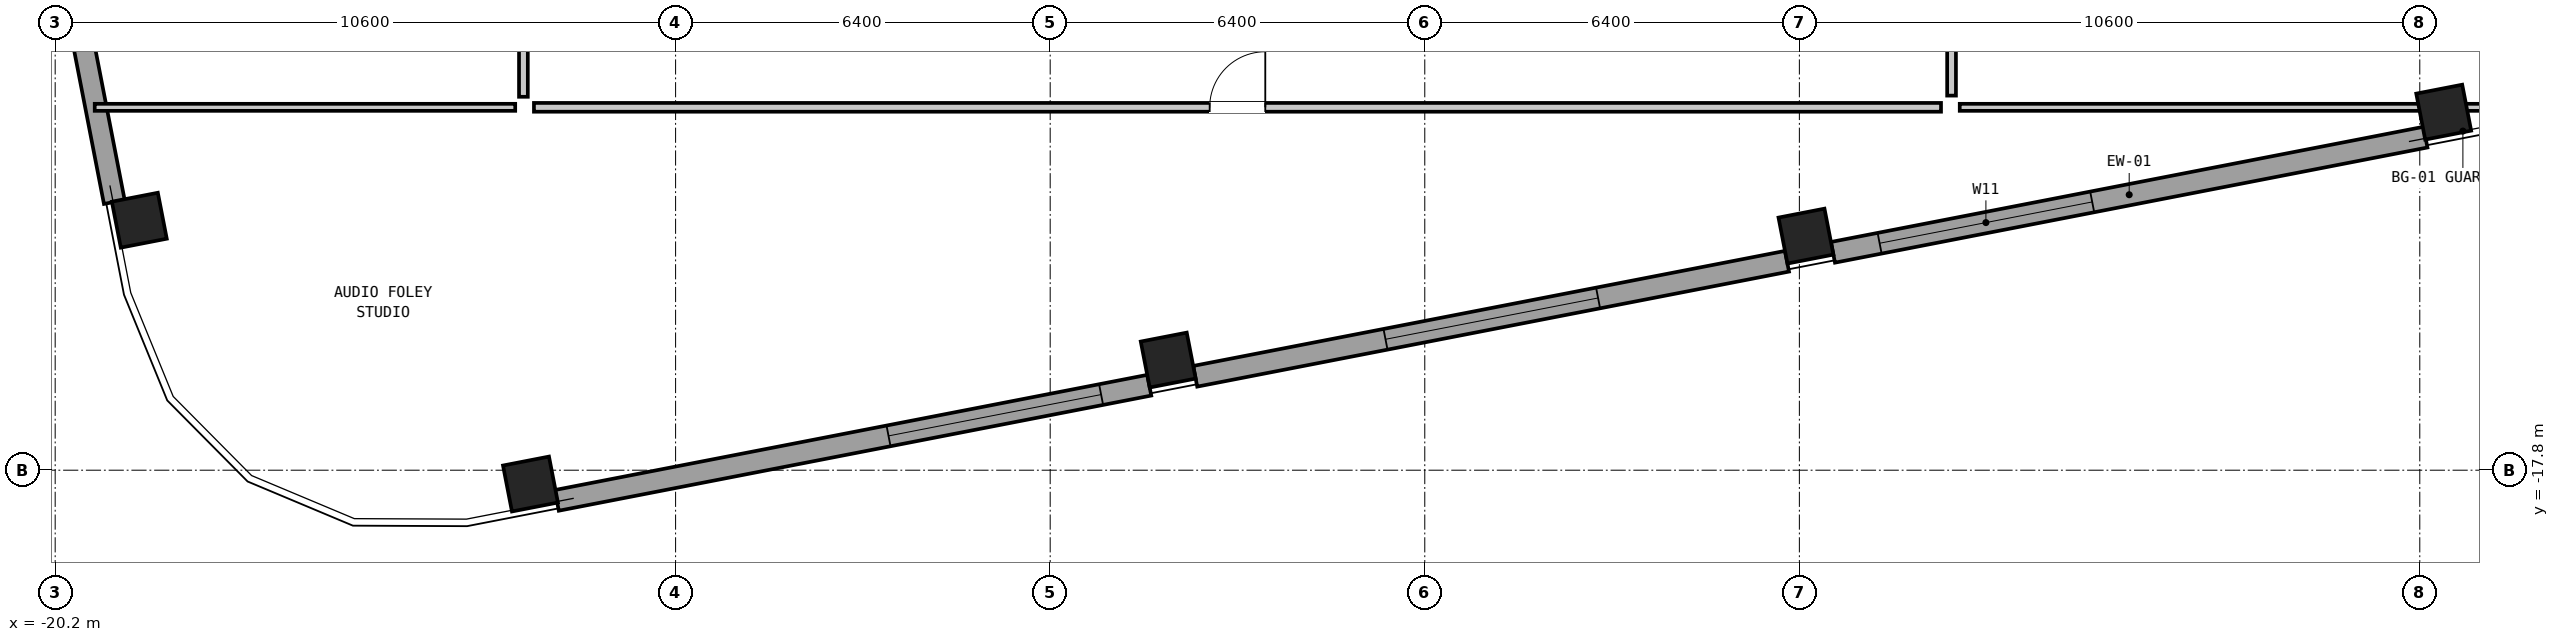
"""IFC4 building model, lengths in metres.
Left out: names, types, materials, properties, quantities, classifications, styles, units other than length and angle.
Written with IfcOpenShell. Run it as: python <this file> out.ifc"""

import sys

from ifc_helpers import new_model, si_unit, direction, frame, frame_2d, origin, origin_2d, place, context, subcontext, project, spatial, rectangle, hollow_rectangle, extrude, element, fill, save


model = new_model("IFC4")
c1 = context("Model", 3, precision=1e-05, world=origin(), true_north=direction((0.0, 1.0)))
c2 = subcontext(c1, "Body", "Model", "MODEL_VIEW")
j1 = project(units=[si_unit("LENGTHUNIT", "METRE"), si_unit("PLANEANGLEUNIT", "RADIAN")], contexts=[c1])
p1 = place(None, origin())
s1 = spatial("IfcSite", under=j1, at=p1, CompositionType="ELEMENT")
p2 = place(p1, origin())
s2 = spatial("IfcBuilding", under=s1, at=p2, CompositionType="ELEMENT")
p3 = place(p2, frame((0.0, 0.0, 112.8)))
s3 = spatial("IfcBuildingStorey", under=s2, at=p3, CompositionType="ELEMENT", Elevation=112.8)
for number, where, z_axis, x_axis in (
    (1, (-12.08, -18.036, 0.0), (0.0, 0.0, 1.0), (0.982, 0.191, 0.0)),
    (2, (-1.183, -15.918, 0.0), (0.0, 0.0, 1.0), (0.982, 0.191, 0.0)),
    (3, (9.713, -13.8, 0.0), (0.0, 0.0, 1.0), (0.982, 0.191, 0.0)),
    (4, (20.609, -11.682, 0.0), (0.0, 0.0, 1.0), (0.982, 0.191, 0.0)),
    (5, (-18.762, -13.529, 0.0), (0.0, 0.0, 1.0), (-0.191, 0.982, 0.0)),
):
    element("IfcColumn", number, at=place(p3, frame(where, z_axis=z_axis, x_axis=x_axis)), inside=s3, PredefinedType="COLUMN", context=c2, shape_type="SweptSolid", body=[
        extrude(hollow_rectangle(XDim=0.8, YDim=0.8, WallThickness=0.05, at=origin_2d()), origin(), (0.0, 0.0, 1.0), 3.05),
    ])
p4 = place(p3, frame((20.296, -12.11, 0.0), z_axis=(0.0, 0.0, 1.0), x_axis=(-0.981628941133, -0.190799952646, 0.0)))
e6 = element("IfcWall", 6, at=p4, inside=s3, PredefinedType="SOLIDWALL", context=c2, shape_type="SweptSolid", body=[
    extrude(rectangle(XDim=10.312, YDim=0.36, at=frame_2d((5.156, 0.0))), origin(), (0.0, 0.0, 1.0), 1.632),
])
p5 = place(p4, frame((5.8, 0.0, 0.2)))
e7 = element("IfcOpeningElement", 7, at=p5, cuts=e6, PredefinedType="OPENING", context=c2, shape_type="SweptSolid", body=[
    extrude(rectangle(XDim=3.7, YDim=1.1, at=frame_2d((1.85, 0.55))), frame((0.0, 0.192, 0.0), z_axis=(0.0, -1.0, 0.0), x_axis=(1.0, 0.0, 0.0)), (0.0, 0.0, 1.0), 0.384),
])
p6 = place(p3, frame((9.389, -14.23, 0.0), z_axis=(0.0, 0.0, 1.0), x_axis=(-0.981627477005, -0.190807485147, 0.0)))
e8 = element("IfcWall", 8, at=p6, inside=s3, PredefinedType="SOLIDWALL", context=c2, shape_type="SweptSolid", body=[
    extrude(rectangle(XDim=10.3, YDim=0.36, at=frame_2d((5.15, 0.0))), origin(), (0.0, 0.0, 1.0), 1.632),
])
p7 = place(p6, frame((3.288, 0.0, 0.2)))
e9 = element("IfcOpeningElement", 9, at=p7, cuts=e8, PredefinedType="OPENING", context=c2, shape_type="SweptSolid", body=[
    extrude(rectangle(XDim=3.7, YDim=1.1, at=frame_2d((1.85, 0.55))), frame((0.0, 0.192, 0.0), z_axis=(0.0, -1.0, 0.0), x_axis=(1.0, 0.0, 0.0)), (0.0, 0.0, 1.0), 0.384),
])
p8 = place(p3, frame((-1.507, -16.348, 0.0), z_axis=(0.0, 0.0, 1.0), x_axis=(-0.981628941133, -0.190799952646, 0.0)))
e10 = element("IfcWall", 10, at=p8, inside=s3, PredefinedType="SOLIDWALL", context=c2, shape_type="SweptSolid", body=[
    extrude(rectangle(XDim=10.312, YDim=0.36, at=frame_2d((5.156, 0.0))), origin(), (0.0, 0.0, 1.0), 1.632),
])
p9 = place(p8, frame((0.838, 0.0, 0.2)))
e11 = element("IfcOpeningElement", 11, at=p9, cuts=e10, PredefinedType="OPENING", context=c2, shape_type="SweptSolid", body=[
    extrude(rectangle(XDim=3.7, YDim=1.1, at=frame_2d((1.85, 0.55))), frame((0.0, 0.192, 0.0), z_axis=(0.0, -1.0, 0.0), x_axis=(1.0, 0.0, 0.0)), (0.0, 0.0, 1.0), 0.384),
])
p10 = place(p3, frame((-19.19, -13.217, 0.0), z_axis=(0.0, 0.0, 1.0), x_axis=(-0.190822765986, 0.981624506612, 0.0)))
e12 = element("IfcWall", 12, at=p10, inside=s3, PredefinedType="SOLIDWALL", context=c2, shape_type="SweptSolid", body=[
    extrude(rectangle(XDim=10.312, YDim=0.36, at=frame_2d((5.156, 0.0))), origin(), (0.0, 0.0, 1.0), 1.632),
])
p11 = place(p10, frame((5.6, 0.0, 0.2)))
e13 = element("IfcOpeningElement", 13, at=p11, cuts=e12, PredefinedType="OPENING", context=c2, shape_type="SweptSolid", body=[
    extrude(rectangle(XDim=4.1, YDim=1.05, at=frame_2d((2.05, 0.525))), frame((0.0, 0.192, 0.0), z_axis=(0.0, -1.0, 0.0), x_axis=(1.0, 0.0, 0.0)), (0.0, 0.0, 1.0), 0.384),
])
p12 = place(p3, frame((-19.524, -11.6, 0.0), z_axis=(0.0, 0.0, 1.0), x_axis=(1.0, 0.0, 0.0)))
e14 = element("IfcWall", 14, at=p12, inside=s3, PredefinedType="PARTITIONING", context=c2, shape_type="SweptSolid", body=[
    extrude(rectangle(XDim=7.184, YDim=0.12, at=frame_2d((3.592, 0.0))), origin(), (0.0, 0.0, 1.0), 2.347),
])
p13 = place(p3, frame((12.34, -11.6, 0.0), z_axis=(0.0, 0.0, 1.0), x_axis=(1.0, 0.0, 0.0)))
e15 = element("IfcWall", 15, at=p13, inside=s3, PredefinedType="PARTITIONING", context=c2, shape_type="SweptSolid", body=[
    extrude(rectangle(XDim=10.066, YDim=0.12, at=frame_2d((5.033, 0.0))), origin(), (0.0, 0.0, 1.0), 1.692),
])
p14 = place(p3, frame((-12.02, -11.6, 0.0), z_axis=(0.0, 0.0, 1.0), x_axis=(1.0, 0.0, 0.0)))
e16 = element("IfcWall", 16, at=p14, inside=s3, PredefinedType="PARTITIONING", context=c2, shape_type="SweptSolid", body=[
    extrude(rectangle(XDim=24.04, YDim=0.15, at=frame_2d((12.02, 0.0))), origin(), (0.0, 0.0, 1.0), 2.347),
])
p15 = place(p14, frame((11.545, 0.0, 0.0)))
e17 = element("IfcOpeningElement", 17, at=p15, cuts=e16, PredefinedType="OPENING", context=c2, shape_type="SweptSolid", body=[
    extrude(rectangle(XDim=0.95, YDim=2.1, at=frame_2d((0.475, 1.05))), frame((0.0, 0.087, 0.0), z_axis=(0.0, -1.0, 0.0), x_axis=(1.0, 0.0, 0.0)), (0.0, 0.0, 1.0), 0.174),
])
p16 = place(p3, frame((-12.2, -11.42, 0.0), z_axis=(0.0, 0.0, 1.0), x_axis=(0.0, 1.0, 0.0)))
e18 = element("IfcWall", 18, at=p16, inside=s3, PredefinedType="PARTITIONING", context=c2, shape_type="SweptSolid", body=[
    extrude(rectangle(XDim=24.04, YDim=0.15, at=frame_2d((12.02, 0.0))), origin(), (0.0, 0.0, 1.0), 2.83),
])
p17 = place(p16, frame((11.545, 0.0, 0.0)))
e19 = element("IfcOpeningElement", 19, at=p17, cuts=e18, PredefinedType="OPENING", context=c2, shape_type="SweptSolid", body=[
    extrude(rectangle(XDim=0.95, YDim=2.1, at=frame_2d((0.475, 1.05))), frame((0.0, 0.087, 0.0), z_axis=(0.0, -1.0, 0.0), x_axis=(1.0, 0.0, 0.0)), (0.0, 0.0, 1.0), 0.174),
])
p18 = place(p3, frame((12.2, -11.4, 0.0), z_axis=(0.0, 0.0, 1.0), x_axis=(0.0, 1.0, 0.0)))
e20 = element("IfcWall", 20, at=p18, inside=s3, PredefinedType="PARTITIONING", context=c2, shape_type="SweptSolid", body=[
    extrude(rectangle(XDim=8.84, YDim=0.15, at=frame_2d((4.42, 0.0))), origin(), (0.0, 0.0, 1.0), 2.83),
])
p19 = place(p18, frame((3.945, 0.0, 0.0)))
e21 = element("IfcOpeningElement", 21, at=p19, cuts=e20, PredefinedType="OPENING", context=c2, shape_type="SweptSolid", body=[
    extrude(rectangle(XDim=0.95, YDim=2.1, at=frame_2d((0.475, 1.05))), frame((0.0, 0.087, 0.0), z_axis=(0.0, -1.0, 0.0), x_axis=(1.0, 0.0, 0.0)), (0.0, 0.0, 1.0), 0.174),
])
p20 = place(p5, origin())
e22 = element("IfcWindow", 22, at=p20, inside=s3, PartitioningType="SINGLE_PANEL", PredefinedType="WINDOW", context=c2, shape_type="SweptSolid", body=[
    extrude(rectangle(XDim=3.7, YDim=1.1, at=frame_2d((1.85, 0.55))), frame((0.0, 0.03, 0.0), z_axis=(0.0, -1.0, 0.0), x_axis=(1.0, 0.0, 0.0)), (0.0, 0.0, 1.0), 0.06),
])
fill(e7, e22)
p21 = place(p7, origin())
e23 = element("IfcWindow", 23, at=p21, inside=s3, PartitioningType="SINGLE_PANEL", PredefinedType="WINDOW", context=c2, shape_type="SweptSolid", body=[
    extrude(rectangle(XDim=3.7, YDim=1.1, at=frame_2d((1.85, 0.55))), frame((0.0, 0.03, 0.0), z_axis=(0.0, -1.0, 0.0), x_axis=(1.0, 0.0, 0.0)), (0.0, 0.0, 1.0), 0.06),
])
fill(e9, e23)
p22 = place(p9, origin())
e24 = element("IfcWindow", 24, at=p22, inside=s3, PartitioningType="SINGLE_PANEL", PredefinedType="WINDOW", context=c2, shape_type="SweptSolid", body=[
    extrude(rectangle(XDim=3.7, YDim=1.1, at=frame_2d((1.85, 0.55))), frame((0.0, 0.03, 0.0), z_axis=(0.0, -1.0, 0.0), x_axis=(1.0, 0.0, 0.0)), (0.0, 0.0, 1.0), 0.06),
])
fill(e11, e24)
p23 = place(p15, origin())
e25 = element("IfcDoor", 25, at=p23, inside=s3, OperationType="SINGLE_SWING_RIGHT", PredefinedType="DOOR", context=c2, shape_type="SweptSolid", body=[
    extrude(rectangle(XDim=0.95, YDim=2.1, at=frame_2d((0.475, 1.05))), frame((0.0, 0.025, 0.0), z_axis=(0.0, -1.0, 0.0), x_axis=(1.0, 0.0, 0.0)), (0.0, 0.0, 1.0), 0.05),
])
fill(e17, e25)
save(model, sys.argv[1])
